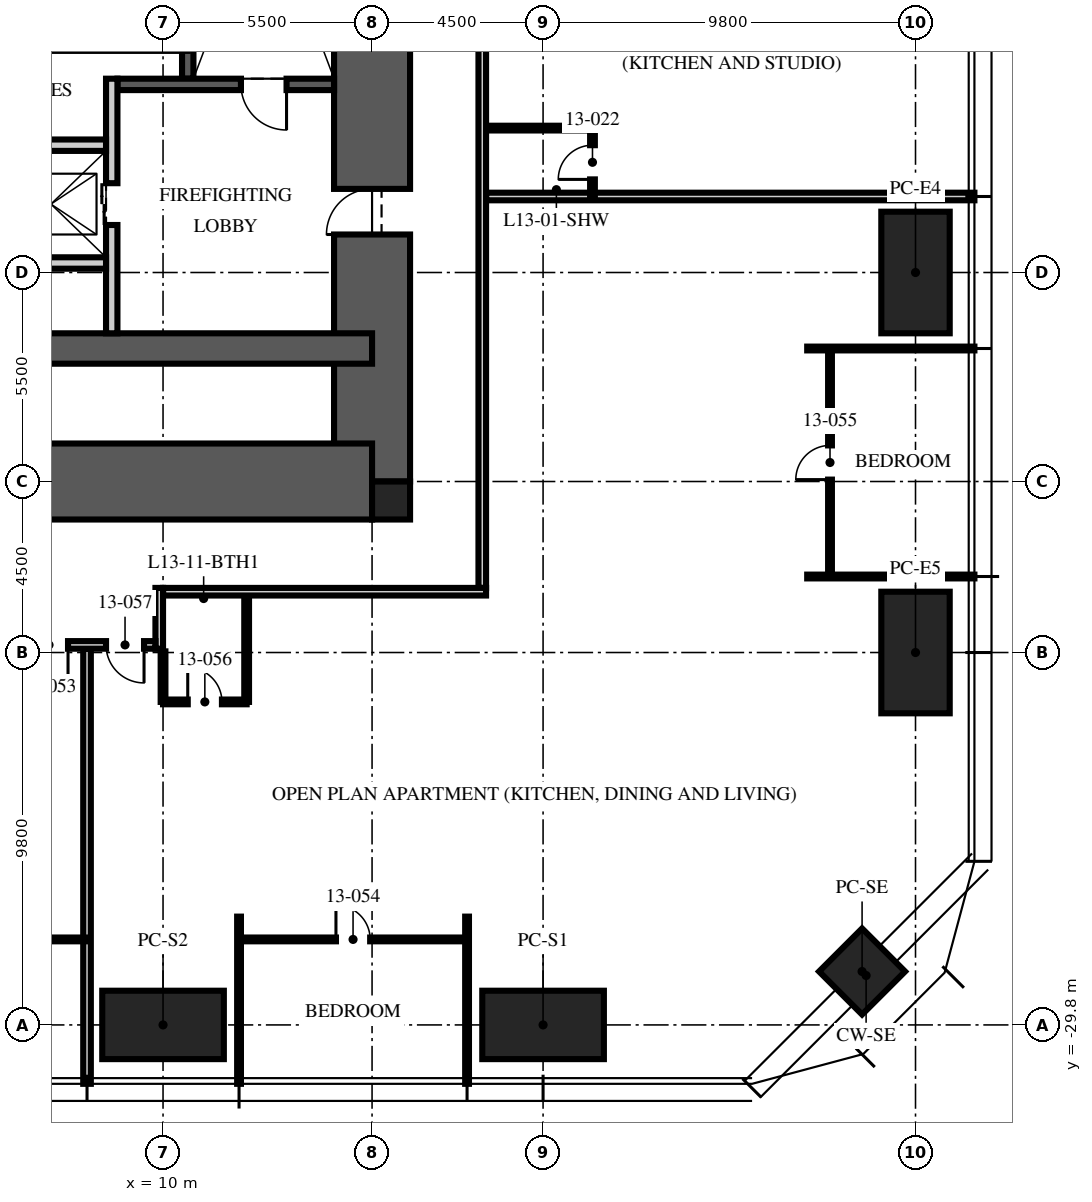
"""IFC4 building model, lengths in metres.
Left out: names, types, materials, properties, quantities, classifications, styles, units other than length and angle.
Written with IfcOpenShell. Run it as: python <this file> out.ifc"""

import sys

from ifc_helpers import new_model, si_unit, direction, frame, frame_2d, origin, origin_2d, place, context, subcontext, project, spatial, rectangle, hollow_rectangle, extrude, element, fill, save


model = new_model("IFC4")
c1 = context("Model", 3, precision=1e-05, world=origin(), true_north=direction((0.0, 1.0)))
c2 = subcontext(c1, "Body", "Model", "MODEL_VIEW")
j1 = project(units=[si_unit("LENGTHUNIT", "METRE"), si_unit("PLANEANGLEUNIT", "RADIAN")], contexts=[c1])
p1 = place(None, origin())
s1 = spatial("IfcSite", under=j1, at=p1, CompositionType="ELEMENT")
p2 = place(p1, origin())
s2 = spatial("IfcBuilding", under=s1, at=p2, CompositionType="ELEMENT")
p3 = place(p2, frame((0.0, 0.0, 54.75)))
s3 = spatial("IfcBuildingStorey", under=s2, at=p3, CompositionType="ELEMENT", Elevation=54.75)
p4 = place(p3, frame((15.5, -15.5, -0.25), z_axis=(0.0, 0.0, 1.0), x_axis=(0.0, 1.0, 0.0)))
e1 = element("IfcWall", 1, at=p4, inside=s3, PredefinedType="SHEAR", context=c2, shape_type="SweptSolid", body=[
    extrude(rectangle(XDim=31.0, YDim=2.0, at=frame_2d((15.5, 0.0))), origin(), (0.0, 0.0, 1.0), 3.75),
])
p5 = place(p4, frame((6.5, 0.0, 0.25)))
e2 = element("IfcOpeningElement", 2, at=p5, cuts=e1, PredefinedType="OPENING", context=c2, shape_type="SweptSolid", body=[
    extrude(rectangle(XDim=1.2, YDim=2.1, at=frame_2d((0.6, 1.05))), frame((0.0, 1.01, 0.0), z_axis=(0.0, -1.0, 0.0), x_axis=(1.0, 0.0, 0.0)), (0.0, 0.0, 1.0), 2.02),
])
p6 = place(p4, frame((23.0, 0.0, 0.25)))
e3 = element("IfcOpeningElement", 3, at=p6, cuts=e1, PredefinedType="OPENING", context=c2, shape_type="SweptSolid", body=[
    extrude(rectangle(XDim=1.8, YDim=2.1, at=frame_2d((0.9, 1.05))), frame((0.0, 1.01, 0.0), z_axis=(0.0, -1.0, 0.0), x_axis=(1.0, 0.0, 0.0)), (0.0, 0.0, 1.0), 2.02),
])
p7 = place(p3, frame((-15.5, -15.5, -0.25), z_axis=(0.0, 0.0, 1.0), x_axis=(1.0, 0.0, 0.0)))
e4 = element("IfcWall", 4, at=p7, inside=s3, PredefinedType="SHEAR", context=c2, shape_type="SweptSolid", body=[
    extrude(rectangle(XDim=31.0, YDim=2.0, at=frame_2d((15.5, 0.0))), origin(), (0.0, 0.0, 1.0), 3.75),
])
p8 = place(p3, frame((-15.5, -12.0, -0.25), z_axis=(0.0, 0.0, 1.0), x_axis=(1.0, 0.0, 0.0)))
e5 = element("IfcWall", 5, at=p8, inside=s3, PredefinedType="SHEAR", context=c2, shape_type="SweptSolid", body=[
    extrude(rectangle(XDim=31.0, YDim=0.8, at=frame_2d((15.5, 0.0))), origin(), (0.0, 0.0, 1.0), 3.75),
])
p9 = place(p3, frame((16.0, -16.0, -0.25), z_axis=(0.0, 0.0, 1.0), x_axis=(1.0, 0.0, 0.0)))
e6 = element("IfcColumn", 6, at=p9, inside=s3, PredefinedType="COLUMN", context=c2, shape_type="SweptSolid", body=[
    extrude(rectangle(XDim=1.0, YDim=1.0, at=origin_2d()), origin(), (0.0, 0.0, 1.0), 3.75),
])
for number, where, z_axis, x_axis in (
    (7, (29.8, -10.0, 0.0), (0.0, 0.0, 1.0), (0.0, 1.0, 0.0)),
    (8, (29.8, -20.0, 0.0), (0.0, 0.0, 1.0), (0.0, 1.0, 0.0)),
    (9, (20.0, -29.8, 0.0), (0.0, 0.0, 1.0), (1.0, 0.0, 0.0)),
    (10, (10.0, -29.8, 0.0), (0.0, 0.0, 1.0), (1.0, 0.0, 0.0)),
):
    element("IfcColumn", number, at=place(p3, frame(where, z_axis=z_axis, x_axis=x_axis)), inside=s3, PredefinedType="COLUMN", context=c2, shape_type="SweptSolid", body=[
        extrude(hollow_rectangle(XDim=3.2, YDim=1.8, WallThickness=0.2, at=origin_2d()), origin(), (0.0, 0.0, 1.0), 3.75),
    ])
p10 = place(p3, frame((28.394, -28.394, 0.0), z_axis=(0.0, 0.0, 1.0), x_axis=(0.707106781187, 0.707106781187, 0.0)))
e11 = element("IfcColumn", 11, at=p10, inside=s3, PredefinedType="COLUMN", context=c2, shape_type="SweptSolid", body=[
    extrude(hollow_rectangle(XDim=1.6, YDim=1.6, WallThickness=0.1, at=origin_2d()), origin(), (0.0, 0.0, 1.0), 3.75),
])
p11 = place(p3, frame((10.65, -4.9, 0.0), z_axis=(0.0, 0.0, 1.0), x_axis=(0.0, 1.0, 0.0)))
e12 = element("IfcWall", 12, at=p11, inside=s3, PredefinedType="SOLIDWALL", context=c2, shape_type="SweptSolid", body=[
    extrude(rectangle(XDim=10.1, YDim=0.3, at=frame_2d((5.05, 0.0))), origin(), (0.0, 0.0, 1.0), 3.5),
])
p12 = place(p3, frame((14.5, -5.05, 0.0), z_axis=(0.0, 0.0, 1.0), x_axis=(-1.0, 0.0, 0.0)))
e13 = element("IfcWall", 13, at=p12, inside=s3, PredefinedType="SOLIDWALL", context=c2, shape_type="SweptSolid", body=[
    extrude(rectangle(XDim=5.7, YDim=0.3, at=frame_2d((2.85, 0.0))), origin(), (0.0, 0.0, 1.0), 3.5),
])
p13 = place(p12, frame((1.25, 0.0, 0.0)))
e14 = element("IfcOpeningElement", 14, at=p13, cuts=e13, PredefinedType="OPENING", context=c2, shape_type="SweptSolid", body=[
    extrude(rectangle(XDim=1.2, YDim=2.1, at=frame_2d((0.6, 1.05))), frame((0.0, 0.16, 0.0), z_axis=(0.0, -1.0, 0.0), x_axis=(1.0, 0.0, 0.0)), (0.0, 0.0, 1.0), 0.32),
])
p14 = place(p3, frame((8.65, -11.6, 0.0), z_axis=(0.0, 0.0, 1.0), x_axis=(0.0, 1.0, 0.0)))
e15 = element("IfcWall", 15, at=p14, inside=s3, PredefinedType="PARTITIONING", context=c2, shape_type="SweptSolid", body=[
    extrude(rectangle(XDim=6.7, YDim=0.3, at=frame_2d((3.35, 0.0))), origin(), (0.0, 0.0, 1.0), 3.5),
])
p15 = place(p14, frame((2.85, 0.0, 0.0)))
e16 = element("IfcOpeningElement", 16, at=p15, cuts=e15, PredefinedType="OPENING", context=c2, shape_type="SweptSolid", body=[
    extrude(rectangle(XDim=1.1, YDim=2.1, at=frame_2d((0.55, 1.05))), frame((0.0, 0.16, 0.0), z_axis=(0.0, -1.0, 0.0), x_axis=(1.0, 0.0, 0.0)), (0.0, 0.0, 1.0), 0.32),
])
p16 = place(p3, frame((-8.5, -6.65, 0.0), z_axis=(0.0, 0.0, 1.0), x_axis=(1.0, 0.0, 0.0)))
e17 = element("IfcWall", 17, at=p16, inside=s3, PredefinedType="PARTITIONING", context=c2, shape_type="SweptSolid", body=[
    extrude(rectangle(XDim=17.0, YDim=0.3, at=frame_2d((8.5, 0.0))), origin(), (0.0, 0.0, 1.0), 3.5),
])
p17 = place(p16, frame((7.8, 0.0, 0.0)))
e18 = element("IfcOpeningElement", 18, at=p17, cuts=e17, PredefinedType="OPENING", context=c2, shape_type="SweptSolid", body=[
    extrude(rectangle(XDim=1.3, YDim=2.4, at=frame_2d((0.65, 1.2))), frame((0.0, 0.16, 0.0), z_axis=(0.0, -1.0, 0.0), x_axis=(1.0, 0.0, 0.0)), (0.0, 0.0, 1.0), 0.32),
])
p18 = place(p16, frame((5.65, 0.0, 0.0)))
e19 = element("IfcOpeningElement", 19, at=p18, cuts=e17, PredefinedType="OPENING", context=c2, shape_type="SweptSolid", body=[
    extrude(rectangle(XDim=0.9, YDim=2.1, at=frame_2d((0.45, 1.05))), frame((0.0, 0.16, 0.0), z_axis=(0.0, -1.0, 0.0), x_axis=(1.0, 0.0, 0.0)), (0.0, 0.0, 1.0), 0.32),
])
p19 = place(p16, frame((10.4, 0.0, 0.0)))
e20 = element("IfcOpeningElement", 20, at=p19, cuts=e17, PredefinedType="OPENING", context=c2, shape_type="SweptSolid", body=[
    extrude(rectangle(XDim=0.9, YDim=2.1, at=frame_2d((0.45, 1.05))), frame((0.0, 0.16, 0.0), z_axis=(0.0, -1.0, 0.0), x_axis=(1.0, 0.0, 0.0)), (0.0, 0.0, 1.0), 0.32),
])
p20 = place(p3, frame((5.6, -9.75, 0.0), z_axis=(0.0, 0.0, 1.0), x_axis=(1.0, 0.0, 0.0)))
e21 = element("IfcWall", 21, at=p20, inside=s3, PredefinedType="PARTITIONING", context=c2, shape_type="SweptSolid", body=[
    extrude(rectangle(XDim=2.9, YDim=0.3, at=frame_2d((1.45, 0.0))), origin(), (0.0, 0.0, 1.0), 3.5),
])
p21 = place(p3, frame((18.5, -8.0, 0.0), z_axis=(0.0, 0.0, 1.0), x_axis=(1.0, 0.0, 0.0)))
e22 = element("IfcWall", 22, at=p21, inside=s3, PredefinedType="PARTITIONING", context=c2, shape_type="SweptSolid", body=[
    extrude(rectangle(XDim=12.85, YDim=0.2, at=frame_2d((6.425, 0.0))), origin(), (0.0, 0.0, 1.0), 2.71),
])
p22 = place(p3, frame((8.0, -19.9, 0.0), z_axis=(0.0, 0.0, 1.0), x_axis=(0.0, -1.0, 0.0)))
e23 = element("IfcWall", 23, at=p22, inside=s3, PredefinedType="PARTITIONING", context=c2, shape_type="SweptSolid", body=[
    extrude(rectangle(XDim=11.45, YDim=0.2, at=frame_2d((5.725, 0.0))), origin(), (0.0, 0.0, 1.0), 2.71),
])
for number, where, z_axis, x_axis in (
    (24, (12.0, -26.95, 0.0), (0.0, 0.0, 1.0), (0.0, -1.0, 0.0)),
    (25, (18.0, -26.95, 0.0), (0.0, 0.0, 1.0), (0.0, -1.0, 0.0)),
    (26, (26.95, -18.0, 0.0), (0.0, 0.0, 1.0), (1.0, 0.0, 0.0)),
    (27, (26.95, -12.0, 0.0), (0.0, 0.0, 1.0), (1.0, 0.0, 0.0)),
):
    element("IfcWall", number, at=place(p3, frame(where, z_axis=z_axis, x_axis=x_axis)), inside=s3, PredefinedType="PARTITIONING", context=c2, shape_type="SweptSolid", body=[
        extrude(rectangle(XDim=4.4, YDim=0.1, at=frame_2d((2.2, 0.0))), origin(), (0.0, 0.0, 1.0), 2.71),
    ])
p23 = place(p3, frame((21.3, -8.0, 0.0), z_axis=(0.0, 0.0, 1.0), x_axis=(0.0, 1.0, 0.0)))
e28 = element("IfcWall", 28, at=p23, inside=s3, PredefinedType="PARTITIONING", context=c2, shape_type="SweptSolid", body=[
    extrude(rectangle(XDim=1.8, YDim=0.125, at=frame_2d((0.9, 0.0))), origin(), (0.0, 0.0, 1.0), 3.5),
])
p24 = place(p23, frame((0.45, 0.0, 0.0)))
e29 = element("IfcOpeningElement", 29, at=p24, cuts=e28, PredefinedType="OPENING", context=c2, shape_type="SweptSolid", body=[
    extrude(rectangle(XDim=0.9, YDim=2.1, at=frame_2d((0.45, 1.05))), frame((0.0, 0.073, 0.0), z_axis=(0.0, -1.0, 0.0), x_axis=(1.0, 0.0, 0.0)), (0.0, 0.0, 1.0), 0.145),
])
p25 = place(p3, frame((18.5, -6.2, 0.0), z_axis=(0.0, 0.0, 1.0), x_axis=(1.0, 0.0, 0.0)))
e30 = element("IfcWall", 30, at=p25, inside=s3, PredefinedType="PARTITIONING", context=c2, shape_type="SweptSolid", body=[
    extrude(rectangle(XDim=2.8, YDim=0.125, at=frame_2d((1.4, 0.0))), origin(), (0.0, 0.0, 1.0), 3.5),
])
p26 = place(p3, frame((2.0, -27.55, 0.0), z_axis=(0.0, 0.0, 1.0), x_axis=(1.0, 0.0, 0.0)))
e31 = element("IfcWall", 31, at=p26, inside=s3, PredefinedType="PARTITIONING", context=c2, shape_type="SweptSolid", body=[
    extrude(rectangle(XDim=6.0, YDim=0.1, at=frame_2d((3.0, 0.0))), origin(), (0.0, 0.0, 1.0), 2.61),
])
p27 = place(p26, frame((2.55, 0.0, 0.0)))
e32 = element("IfcOpeningElement", 32, at=p27, cuts=e31, PredefinedType="OPENING", context=c2, shape_type="SweptSolid", body=[
    extrude(rectangle(XDim=0.9, YDim=2.1, at=frame_2d((0.45, 1.05))), frame((0.0, 0.06, 0.0), z_axis=(0.0, -1.0, 0.0), x_axis=(1.0, 0.0, 0.0)), (0.0, 0.0, 1.0), 0.12),
])
p28 = place(p3, frame((12.0, -27.55, 0.0), z_axis=(0.0, 0.0, 1.0), x_axis=(1.0, 0.0, 0.0)))
e33 = element("IfcWall", 33, at=p28, inside=s3, PredefinedType="PARTITIONING", context=c2, shape_type="SweptSolid", body=[
    extrude(rectangle(XDim=6.0, YDim=0.1, at=frame_2d((3.0, 0.0))), origin(), (0.0, 0.0, 1.0), 2.61),
])
p29 = place(p28, frame((2.55, 0.0, 0.0)))
e34 = element("IfcOpeningElement", 34, at=p29, cuts=e33, PredefinedType="OPENING", context=c2, shape_type="SweptSolid", body=[
    extrude(rectangle(XDim=0.9, YDim=2.1, at=frame_2d((0.45, 1.05))), frame((0.0, 0.06, 0.0), z_axis=(0.0, -1.0, 0.0), x_axis=(1.0, 0.0, 0.0)), (0.0, 0.0, 1.0), 0.12),
])
p30 = place(p3, frame((27.55, -18.0, 0.0), z_axis=(0.0, 0.0, 1.0), x_axis=(0.0, 1.0, 0.0)))
e35 = element("IfcWall", 35, at=p30, inside=s3, PredefinedType="PARTITIONING", context=c2, shape_type="SweptSolid", body=[
    extrude(rectangle(XDim=6.0, YDim=0.1, at=frame_2d((3.0, 0.0))), origin(), (0.0, 0.0, 1.0), 2.61),
])
p31 = place(p30, frame((2.55, 0.0, 0.0)))
e36 = element("IfcOpeningElement", 36, at=p31, cuts=e35, PredefinedType="OPENING", context=c2, shape_type="SweptSolid", body=[
    extrude(rectangle(XDim=0.9, YDim=2.1, at=frame_2d((0.45, 1.05))), frame((0.0, 0.06, 0.0), z_axis=(0.0, -1.0, 0.0), x_axis=(1.0, 0.0, 0.0)), (0.0, 0.0, 1.0), 0.12),
])
p32 = place(p3, frame((10.0, -21.3, 0.0), z_axis=(0.0, 0.0, 1.0), x_axis=(1.0, 0.0, 0.0)))
e37 = element("IfcWall", 37, at=p32, inside=s3, PredefinedType="PARTITIONING", context=c2, shape_type="SweptSolid", body=[
    extrude(rectangle(XDim=2.2, YDim=0.125, at=frame_2d((1.1, 0.0))), origin(), (0.0, 0.0, 1.0), 2.492),
])
p33 = place(p32, frame((0.65, 0.0, 0.0)))
e38 = element("IfcOpeningElement", 38, at=p33, cuts=e37, PredefinedType="OPENING", context=c2, shape_type="SweptSolid", body=[
    extrude(rectangle(XDim=0.9, YDim=2.1, at=frame_2d((0.45, 1.05))), frame((0.0, 0.073, 0.0), z_axis=(0.0, -1.0, 0.0), x_axis=(1.0, 0.0, 0.0)), (0.0, 0.0, 1.0), 0.145),
])
p34 = place(p3, frame((10.0, -19.97, 0.0), z_axis=(0.0, 0.0, 1.0), x_axis=(0.0, -1.0, 0.0)))
e39 = element("IfcWall", 39, at=p34, inside=s3, PredefinedType="PARTITIONING", context=c2, shape_type="SweptSolid", body=[
    extrude(rectangle(XDim=1.33, YDim=0.125, at=frame_2d((0.665, 0.0))), origin(), (0.0, 0.0, 1.0), 2.492),
])
p35 = place(p3, frame((12.2, -18.5, 0.0), z_axis=(0.0, 0.0, 1.0), x_axis=(0.0, -1.0, 0.0)))
e40 = element("IfcWall", 40, at=p35, inside=s3, PredefinedType="PARTITIONING", context=c2, shape_type="SweptSolid", body=[
    extrude(rectangle(XDim=2.8, YDim=0.125, at=frame_2d((1.4, 0.0))), origin(), (0.0, 0.0, 1.0), 3.5),
])
p36 = place(p3, frame((18.4, -18.3, 0.0), z_axis=(0.0, 0.0, 1.0), x_axis=(0.0, 1.0, 0.0)))
e41 = element("IfcWall", 41, at=p36, inside=s3, PredefinedType="PARTITIONING", context=c2, shape_type="SweptSolid", body=[
    extrude(rectangle(XDim=36.6, YDim=0.2, at=frame_2d((18.3, 0.0))), origin(), (0.0, 0.0, 1.0), 2.3),
])
p37 = place(p36, frame((14.87, 0.0, 0.0)))
e42 = element("IfcOpeningElement", 42, at=p37, cuts=e41, PredefinedType="OPENING", context=c2, shape_type="SweptSolid", body=[
    extrude(rectangle(XDim=1.0, YDim=2.2, at=frame_2d((0.5, 1.1))), frame((0.0, 0.11, 0.0), z_axis=(0.0, -1.0, 0.0), x_axis=(1.0, 0.0, 0.0)), (0.0, 0.0, 1.0), 0.22),
])
p38 = place(p36, frame((18.87, 0.0, 0.0)))
e43 = element("IfcOpeningElement", 43, at=p38, cuts=e41, PredefinedType="OPENING", context=c2, shape_type="SweptSolid", body=[
    extrude(rectangle(XDim=1.0, YDim=2.2, at=frame_2d((0.5, 1.1))), frame((0.0, 0.11, 0.0), z_axis=(0.0, -1.0, 0.0), x_axis=(1.0, 0.0, 0.0)), (0.0, 0.0, 1.0), 0.22),
])
p39 = place(p36, frame((34.82, 0.0, 0.0)))
e44 = element("IfcOpeningElement", 44, at=p39, cuts=e41, PredefinedType="OPENING", context=c2, shape_type="SweptSolid", body=[
    extrude(rectangle(XDim=1.0, YDim=2.2, at=frame_2d((0.5, 1.1))), frame((0.0, 0.11, 0.0), z_axis=(0.0, -1.0, 0.0), x_axis=(1.0, 0.0, 0.0)), (0.0, 0.0, 1.0), 0.22),
])
p40 = place(p3, frame((18.5, -18.4, 0.0), z_axis=(0.0, 0.0, 1.0), x_axis=(-1.0, 0.0, 0.0)))
e45 = element("IfcWall", 45, at=p40, inside=s3, PredefinedType="PARTITIONING", context=c2, shape_type="SweptSolid", body=[
    extrude(rectangle(XDim=8.5, YDim=0.2, at=frame_2d((4.25, 0.0))), origin(), (0.0, 0.0, 1.0), 2.3),
])
p41 = place(p3, frame((9.9, -18.3, 0.0), z_axis=(0.0, 0.0, 1.0), x_axis=(0.0, -1.0, 0.0)))
e46 = element("IfcWall", 46, at=p41, inside=s3, PredefinedType="PARTITIONING", context=c2, shape_type="SweptSolid", body=[
    extrude(rectangle(XDim=1.6, YDim=0.2, at=frame_2d((0.8, 0.0))), origin(), (0.0, 0.0, 1.0), 2.492),
])
p42 = place(p3, frame((9.8, -19.8, 0.0), z_axis=(0.0, 0.0, 1.0), x_axis=(-1.0, 0.0, 0.0)))
e47 = element("IfcWall", 47, at=p42, inside=s3, PredefinedType="PARTITIONING", context=c2, shape_type="SweptSolid", body=[
    extrude(rectangle(XDim=3.6, YDim=0.2, at=frame_2d((1.8, 0.0))), origin(), (0.0, 0.0, 1.0), 3.5),
])
p43 = place(p42, frame((2.3, 0.0, 0.0)))
e48 = element("IfcOpeningElement", 48, at=p43, cuts=e47, PredefinedType="OPENING", context=c2, shape_type="SweptSolid", body=[
    extrude(rectangle(XDim=1.0, YDim=2.2, at=frame_2d((0.5, 1.1))), frame((0.0, 0.11, 0.0), z_axis=(0.0, -1.0, 0.0), x_axis=(1.0, 0.0, 0.0)), (0.0, 0.0, 1.0), 0.22),
])
p44 = place(p42, frame((0.3, 0.0, 0.0)))
e49 = element("IfcOpeningElement", 49, at=p44, cuts=e47, PredefinedType="OPENING", context=c2, shape_type="SweptSolid", body=[
    extrude(rectangle(XDim=1.0, YDim=2.2, at=frame_2d((0.5, 1.1))), frame((0.0, 0.11, 0.0), z_axis=(0.0, -1.0, 0.0), x_axis=(1.0, 0.0, 0.0)), (0.0, 0.0, 1.0), 0.22),
])
p45 = place(p13, origin())
e50 = element("IfcDoor", 50, at=p45, inside=s3, OperationType="SINGLE_SWING_LEFT", PredefinedType="DOOR", context=c2, shape_type="SweptSolid", body=[
    extrude(rectangle(XDim=1.2, YDim=2.1, at=frame_2d((0.6, 1.05))), frame((0.0, 0.025, 0.0), z_axis=(0.0, -1.0, 0.0), x_axis=(1.0, 0.0, 0.0)), (0.0, 0.0, 1.0), 0.05),
])
fill(e14, e50)
p46 = place(p5, origin())
e51 = element("IfcDoor", 51, at=p46, inside=s3, OperationType="SINGLE_SWING_LEFT", PredefinedType="DOOR", context=c2, shape_type="SweptSolid", body=[
    extrude(rectangle(XDim=1.2, YDim=2.1, at=frame_2d((0.6, 1.05))), frame((0.0, 0.025, 0.0), z_axis=(0.0, -1.0, 0.0), x_axis=(1.0, 0.0, 0.0)), (0.0, 0.0, 1.0), 0.05),
])
fill(e2, e51)
p47 = place(p15, origin())
e52 = element("IfcDoor", 52, at=p47, inside=s3, OperationType="DOUBLE_DOOR_SLIDING", PredefinedType="DOOR", context=c2, shape_type="SweptSolid", body=[
    extrude(rectangle(XDim=1.1, YDim=2.1, at=frame_2d((0.55, 1.05))), frame((0.0, 0.025, 0.0), z_axis=(0.0, -1.0, 0.0), x_axis=(1.0, 0.0, 0.0)), (0.0, 0.0, 1.0), 0.05),
])
fill(e16, e52)
p48 = place(p24, origin())
e53 = element("IfcDoor", 53, at=p48, inside=s3, OperationType="SINGLE_SWING_LEFT", PredefinedType="DOOR", context=c2, shape_type="SweptSolid", body=[
    extrude(rectangle(XDim=0.9, YDim=2.1, at=frame_2d((0.45, 1.05))), frame((0.0, 0.025, 0.0), z_axis=(0.0, -1.0, 0.0), x_axis=(1.0, 0.0, 0.0)), (0.0, 0.0, 1.0), 0.05),
])
fill(e29, e53)
p49 = place(p43, origin())
e54 = element("IfcDoor", 54, at=p49, inside=s3, OperationType="SINGLE_SWING_LEFT", PredefinedType="DOOR", context=c2, shape_type="SweptSolid", body=[
    extrude(rectangle(XDim=1.0, YDim=2.2, at=frame_2d((0.5, 1.1))), frame((0.0, 0.025, 0.0), z_axis=(0.0, -1.0, 0.0), x_axis=(1.0, 0.0, 0.0)), (0.0, 0.0, 1.0), 0.05),
])
fill(e48, e54)
p50 = place(p29, origin())
e55 = element("IfcDoor", 55, at=p50, inside=s3, OperationType="SINGLE_SWING_LEFT", PredefinedType="DOOR", context=c2, shape_type="SweptSolid", body=[
    extrude(rectangle(XDim=0.9, YDim=2.1, at=frame_2d((0.45, 1.05))), frame((0.0, 0.025, 0.0), z_axis=(0.0, -1.0, 0.0), x_axis=(1.0, 0.0, 0.0)), (0.0, 0.0, 1.0), 0.05),
])
fill(e34, e55)
p51 = place(p31, origin())
e56 = element("IfcDoor", 56, at=p51, inside=s3, OperationType="SINGLE_SWING_LEFT", PredefinedType="DOOR", context=c2, shape_type="SweptSolid", body=[
    extrude(rectangle(XDim=0.9, YDim=2.1, at=frame_2d((0.45, 1.05))), frame((0.0, 0.025, 0.0), z_axis=(0.0, -1.0, 0.0), x_axis=(1.0, 0.0, 0.0)), (0.0, 0.0, 1.0), 0.05),
])
fill(e36, e56)
p52 = place(p33, origin())
e57 = element("IfcDoor", 57, at=p52, inside=s3, OperationType="SINGLE_SWING_LEFT", PredefinedType="DOOR", context=c2, shape_type="SweptSolid", body=[
    extrude(rectangle(XDim=0.9, YDim=2.1, at=frame_2d((0.45, 1.05))), frame((0.0, 0.025, 0.0), z_axis=(0.0, -1.0, 0.0), x_axis=(1.0, 0.0, 0.0)), (0.0, 0.0, 1.0), 0.05),
])
fill(e38, e57)
p53 = place(p44, origin())
e58 = element("IfcDoor", 58, at=p53, inside=s3, OperationType="SINGLE_SWING_LEFT", PredefinedType="DOOR", context=c2, shape_type="SweptSolid", body=[
    extrude(rectangle(XDim=1.0, YDim=2.2, at=frame_2d((0.5, 1.1))), frame((0.0, 0.025, 0.0), z_axis=(0.0, -1.0, 0.0), x_axis=(1.0, 0.0, 0.0)), (0.0, 0.0, 1.0), 0.05),
])
fill(e49, e58)
save(model, sys.argv[1])
